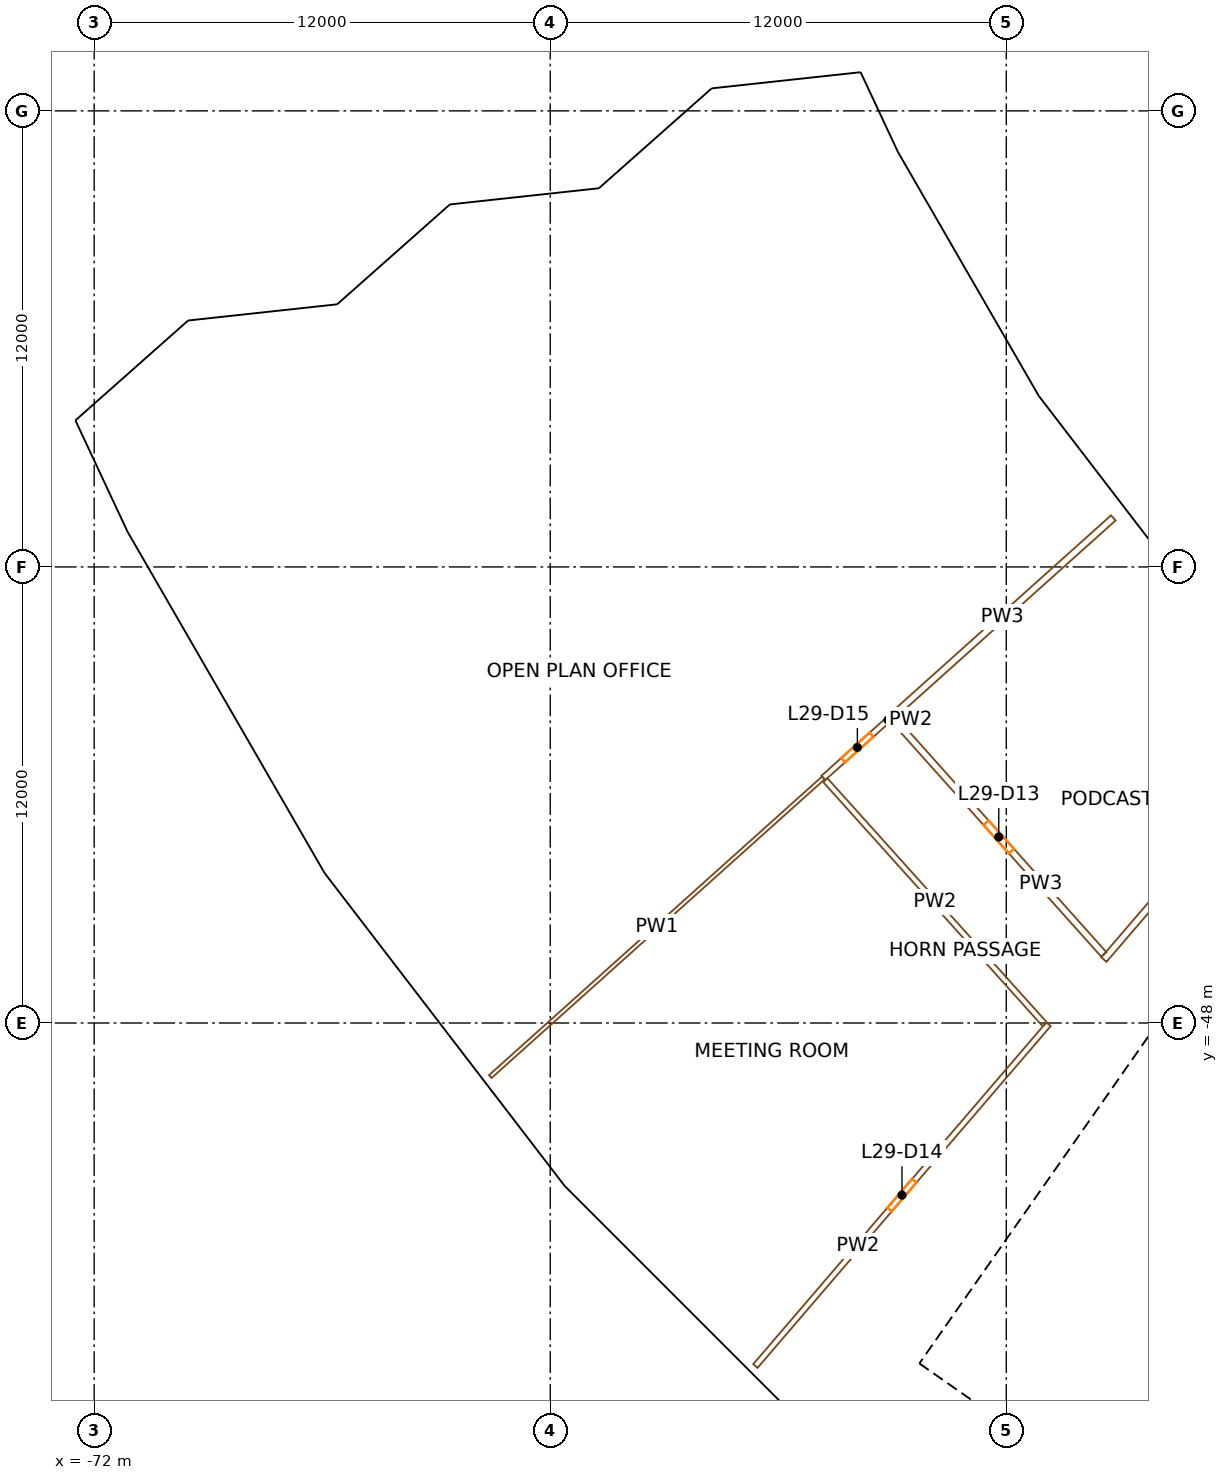
"""IFC4 building model, lengths in metres.
Left out: names, types, materials, properties, quantities, classifications, styles, units other than length and angle.
Written with IfcOpenShell. Run it as: python <this file> out.ifc"""

import sys

from ifc_helpers import new_model, si_unit, direction, frame, frame_2d, origin, origin_2d, place, context, subcontext, project, spatial, rectangle, extrude, element, fill, save


model = new_model("IFC4")
c1 = context("Model", 3, precision=1e-05, world=origin(), true_north=direction((0.0, 1.0)))
c2 = subcontext(c1, "Body", "Model", "MODEL_VIEW")
j1 = project(units=[si_unit("LENGTHUNIT", "METRE"), si_unit("PLANEANGLEUNIT", "RADIAN")], contexts=[c1])
p1 = place(None, origin())
s1 = spatial("IfcSite", under=j1, at=p1, CompositionType="ELEMENT")
p2 = place(p1, origin())
s2 = spatial("IfcBuilding", under=s1, at=p2, CompositionType="ELEMENT")
p3 = place(p2, frame((0.0, 0.0, 129.1)))
s3 = spatial("IfcBuildingStorey", under=s2, at=p3, CompositionType="ELEMENT", Elevation=129.1)
for number, where, z_axis, x_axis in (
    (1, (-52.243, -25.763, 0.0), (0.0, 0.0, 1.0), (0.442, -0.897, 0.0)),
    (2, (-69.732, -34.388, 0.0), (0.0, 0.0, 1.0), (0.442, -0.897, 0.0)),
    (3, (-48.433, -32.362, 0.0), (0.0, 0.0, 1.0), (0.556, -0.831, 0.0)),
    (4, (-64.647, -43.196, 0.0), (0.0, 0.0, 1.0), (0.556, -0.831, 0.0)),
    (5, (-43.795, -38.407, 0.0), (0.0, 0.0, 1.0), (0.659, -0.752, 0.0)),
    (6, (-58.456, -51.264, 0.0), (0.0, 0.0, 1.0), (0.659, -0.752, 0.0)),
    (7, (-51.264, -58.456, 0.0), (0.0, 0.0, 1.0), (0.752, -0.659, 0.0)),
):
    element("IfcColumn", number, at=place(p3, frame(where, z_axis=z_axis, x_axis=x_axis)), inside=s3, PredefinedType="COLUMN", context=c2, shape_type="SweptSolid", body=[
        extrude(rectangle(XDim=1.2, YDim=1.5, at=origin_2d()), origin(), (0.0, 0.0, 1.0), 3.8),
    ])
p4 = place(p3, frame((-49.779, -57.191, 0.0), z_axis=(0.0, 0.0, 1.0), x_axis=(0.573577477574, 0.819151315216, 0.0)))
e8 = element("IfcWall", 8, at=p4, inside=s3, PredefinedType="SHEAR", context=c2, shape_type="SweptSolid", body=[
    extrude(rectangle(XDim=14.8, YDim=0.9, at=frame_2d((7.4, 0.0))), origin(), (0.0, 0.0, 1.0), 3.5),
])
p5 = place(p4, frame((6.7, 0.0, 0.0)))
e9 = element("IfcOpeningElement", 9, at=p5, cuts=e8, PredefinedType="OPENING", context=c2, shape_type="SweptSolid", body=[
    extrude(rectangle(XDim=1.4, YDim=2.1, at=frame_2d((0.7, 1.05))), frame((0.0, 0.46, 0.0), z_axis=(0.0, -1.0, 0.0), x_axis=(1.0, 0.0, 0.0)), (0.0, 0.0, 1.0), 0.92),
])
p6 = place(p3, frame((-36.827, -65.71, 0.0), z_axis=(0.0, 0.0, 1.0), x_axis=(-0.819153391756, 0.573574511963, 0.0)))
e10 = element("IfcWall", 10, at=p6, inside=s3, PredefinedType="SHEAR", context=c2, shape_type="SweptSolid", body=[
    extrude(rectangle(XDim=15.045, YDim=0.9, at=frame_2d((7.523, 0.0))), origin(), (0.0, 0.0, 1.0), 3.5),
])
p7 = place(p6, frame((0.6, 0.0, 0.0)))
e11 = element("IfcOpeningElement", 11, at=p7, cuts=e10, PredefinedType="OPENING", context=c2, shape_type="SweptSolid", body=[
    extrude(rectangle(XDim=1.0, YDim=2.1, at=frame_2d((0.5, 1.05))), frame((0.0, 0.46, 0.0), z_axis=(0.0, -1.0, 0.0), x_axis=(1.0, 0.0, 0.0)), (0.0, 0.0, 1.0), 0.92),
])
p8 = place(p6, frame((3.275, 0.0, 0.0)))
e12 = element("IfcOpeningElement", 12, at=p8, cuts=e10, PredefinedType="OPENING", context=c2, shape_type="SweptSolid", body=[
    extrude(rectangle(XDim=1.0, YDim=2.1, at=frame_2d((0.5, 1.05))), frame((0.0, 0.46, 0.0), z_axis=(0.0, -1.0, 0.0), x_axis=(1.0, 0.0, 0.0)), (0.0, 0.0, 1.0), 0.92),
])
p9 = place(p6, frame((6.175, 0.0, 0.0)))
e13 = element("IfcOpeningElement", 13, at=p9, cuts=e10, PredefinedType="OPENING", context=c2, shape_type="SweptSolid", body=[
    extrude(rectangle(XDim=1.0, YDim=2.1, at=frame_2d((0.5, 1.05))), frame((0.0, 0.46, 0.0), z_axis=(0.0, -1.0, 0.0), x_axis=(1.0, 0.0, 0.0)), (0.0, 0.0, 1.0), 0.92),
])
p10 = place(p6, frame((13.495, 0.0, 0.0)))
e14 = element("IfcOpeningElement", 14, at=p10, cuts=e10, PredefinedType="OPENING", context=c2, shape_type="SweptSolid", body=[
    extrude(rectangle(XDim=1.1, YDim=2.1, at=frame_2d((0.55, 1.05))), frame((0.0, 0.46, 0.0), z_axis=(0.0, -1.0, 0.0), x_axis=(1.0, 0.0, 0.0)), (0.0, 0.0, 1.0), 0.92),
])
p11 = place(p3, frame((-41.262, -57.661, 0.0), z_axis=(0.0, 0.0, 1.0), x_axis=(-0.819164398642, 0.573558792102, 0.0)))
e15 = element("IfcWall", 15, at=p11, inside=s3, PredefinedType="SOLIDWALL", context=c2, shape_type="SweptSolid", body=[
    extrude(rectangle(XDim=6.795, YDim=0.3, at=frame_2d((3.397, 0.0))), origin(), (0.0, 0.0, 1.0), 3.5),
])
p12 = place(p11, frame((5.32, 0.0, 0.0)))
e16 = element("IfcOpeningElement", 16, at=p12, cuts=e15, PredefinedType="OPENING", context=c2, shape_type="SweptSolid", body=[
    extrude(rectangle(XDim=1.1, YDim=2.1, at=frame_2d((0.55, 1.05))), frame((0.0, 0.16, 0.0), z_axis=(0.0, -1.0, 0.0), x_axis=(1.0, 0.0, 0.0)), (0.0, 0.0, 1.0), 0.32),
])
p13 = place(p3, frame((-52.203, -23.224, 0.0), z_axis=(0.0, 0.0, 1.0), x_axis=(-0.99416672279, -0.107854194623, 0.0)))
e17 = element("IfcWall", 17, at=p13, inside=s3, PredefinedType="SOLIDWALL", context=c2, shape_type="SweptSolid", body=[
    extrude(rectangle(XDim=3.275, YDim=0.4, at=frame_2d((1.638, 0.0))), origin(), (0.0, 0.0, 1.0), 2.7),
])
p14 = place(p13, frame((0.638, 0.0, 0.9)))
e18 = element("IfcOpeningElement", 18, at=p14, cuts=e17, PredefinedType="OPENING", context=c2, shape_type="SweptSolid", body=[
    extrude(rectangle(XDim=2.0, YDim=1.425, at=frame_2d((1.0, 0.712))), frame((0.0, 0.21, 0.0), z_axis=(0.0, -1.0, 0.0), x_axis=(1.0, 0.0, 0.0)), (0.0, 0.0, 1.0), 0.42),
])
p15 = place(p3, frame((-55.581, -23.524, 0.0), z_axis=(0.0, 0.0, 1.0), x_axis=(-0.748618719126, -0.663000764233, 0.0)))
e19 = element("IfcWall", 19, at=p15, inside=s3, PredefinedType="SOLIDWALL", context=c2, shape_type="SweptSolid", body=[
    extrude(rectangle(XDim=4.195, YDim=0.4, at=frame_2d((2.097, 0.0))), origin(), (0.0, 0.0, 1.0), 2.7),
])
p16 = place(p15, frame((1.097, 0.0, 0.9)))
e20 = element("IfcOpeningElement", 20, at=p16, cuts=e19, PredefinedType="OPENING", context=c2, shape_type="SweptSolid", body=[
    extrude(rectangle(XDim=2.0, YDim=1.425, at=frame_2d((1.0, 0.712))), frame((0.0, 0.21, 0.0), z_axis=(0.0, -1.0, 0.0), x_axis=(1.0, 0.0, 0.0)), (0.0, 0.0, 1.0), 0.42),
])
p17 = place(p3, frame((-58.843, -26.251, 0.0), z_axis=(0.0, 0.0, 1.0), x_axis=(-0.99416014316, -0.107914826381, 0.0)))
e21 = element("IfcWall", 21, at=p17, inside=s3, PredefinedType="SOLIDWALL", context=c2, shape_type="SweptSolid", body=[
    extrude(rectangle(XDim=3.525, YDim=0.4, at=frame_2d((1.762, 0.0))), origin(), (0.0, 0.0, 1.0), 2.7),
])
p18 = place(p17, frame((0.762, 0.0, 0.9)))
e22 = element("IfcOpeningElement", 22, at=p18, cuts=e21, PredefinedType="OPENING", context=c2, shape_type="SweptSolid", body=[
    extrude(rectangle(XDim=2.0, YDim=1.425, at=frame_2d((1.0, 0.712))), frame((0.0, 0.21, 0.0), z_axis=(0.0, -1.0, 0.0), x_axis=(1.0, 0.0, 0.0)), (0.0, 0.0, 1.0), 0.42),
])
p19 = place(p3, frame((-62.469, -26.578, 0.0), z_axis=(0.0, 0.0, 1.0), x_axis=(-0.748522947977, -0.663108887252, 0.0)))
e23 = element("IfcWall", 23, at=p19, inside=s3, PredefinedType="SOLIDWALL", context=c2, shape_type="SweptSolid", body=[
    extrude(rectangle(XDim=4.193, YDim=0.4, at=frame_2d((2.097, 0.0))), origin(), (0.0, 0.0, 1.0), 2.7),
])
p20 = place(p19, frame((1.097, 0.0, 0.9)))
e24 = element("IfcOpeningElement", 24, at=p20, cuts=e23, PredefinedType="OPENING", context=c2, shape_type="SweptSolid", body=[
    extrude(rectangle(XDim=2.0, YDim=1.425, at=frame_2d((1.0, 0.712))), frame((0.0, 0.21, 0.0), z_axis=(0.0, -1.0, 0.0), x_axis=(1.0, 0.0, 0.0)), (0.0, 0.0, 1.0), 0.42),
])
p21 = place(p3, frame((-65.73, -29.304, 0.0), z_axis=(0.0, 0.0, 1.0), x_axis=(-0.994147697077, -0.108029423756, 0.0)))
e25 = element("IfcWall", 25, at=p21, inside=s3, PredefinedType="SOLIDWALL", context=c2, shape_type="SweptSolid", body=[
    extrude(rectangle(XDim=3.526, YDim=0.4, at=frame_2d((1.763, 0.0))), origin(), (0.0, 0.0, 1.0), 2.7),
])
p22 = place(p21, frame((0.763, 0.0, 0.9)))
e26 = element("IfcOpeningElement", 26, at=p22, cuts=e25, PredefinedType="OPENING", context=c2, shape_type="SweptSolid", body=[
    extrude(rectangle(XDim=2.0, YDim=1.425, at=frame_2d((1.0, 0.712))), frame((0.0, 0.21, 0.0), z_axis=(0.0, -1.0, 0.0), x_axis=(1.0, 0.0, 0.0)), (0.0, 0.0, 1.0), 0.42),
])
p23 = place(p3, frame((-69.357, -29.632, 0.0), z_axis=(0.0, 0.0, 1.0), x_axis=(-0.748462219631, -0.663177431601, 0.0)))
e27 = element("IfcWall", 27, at=p23, inside=s3, PredefinedType="SOLIDWALL", context=c2, shape_type="SweptSolid", body=[
    extrude(rectangle(XDim=4.013, YDim=0.4, at=frame_2d((2.007, 0.0))), origin(), (0.0, 0.0, 1.0), 2.7),
])
p24 = place(p23, frame((1.007, 0.0, 0.9)))
e28 = element("IfcOpeningElement", 28, at=p24, cuts=e27, PredefinedType="OPENING", context=c2, shape_type="SweptSolid", body=[
    extrude(rectangle(XDim=2.0, YDim=1.425, at=frame_2d((1.0, 0.712))), frame((0.0, 0.21, 0.0), z_axis=(0.0, -1.0, 0.0), x_axis=(1.0, 0.0, 0.0)), (0.0, 0.0, 1.0), 0.42),
])
p25 = place(p3, frame((-51.024, -25.184, 0.0), z_axis=(0.0, 0.0, 1.0), x_axis=(-0.42383284824, 0.905740424599, 0.0)))
e29 = element("IfcWall", 29, at=p25, inside=s3, PredefinedType="SOLIDWALL", context=c2, shape_type="SweptSolid", body=[
    extrude(rectangle(XDim=2.384, YDim=0.4, at=frame_2d((1.192, 0.0))), origin(), (0.0, 0.0, 1.0), 2.7),
])
p26 = place(p3, frame((-47.336, -31.568, 0.0), z_axis=(0.0, 0.0, 1.0), x_axis=(-0.499980071345, 0.866036909293, 0.0)))
e30 = element("IfcWall", 30, at=p26, inside=s3, PredefinedType="SOLIDWALL", context=c2, shape_type="SweptSolid", body=[
    extrude(rectangle(XDim=7.356, YDim=0.4, at=frame_2d((3.678, 0.0))), origin(), (0.0, 0.0, 1.0), 2.7),
])
p27 = place(p26, frame((4.225, 0.0, 0.9)))
e31 = element("IfcOpeningElement", 31, at=p27, cuts=e30, PredefinedType="OPENING", context=c2, shape_type="SweptSolid", body=[
    extrude(rectangle(XDim=2.6, YDim=1.65, at=frame_2d((1.3, 0.825))), frame((0.0, 0.21, 0.0), z_axis=(0.0, -1.0, 0.0), x_axis=(1.0, 0.0, 0.0)), (0.0, 0.0, 1.0), 0.42),
])
p28 = place(p26, frame((0.517, 0.0, 0.9)))
e32 = element("IfcOpeningElement", 32, at=p28, cuts=e30, PredefinedType="OPENING", context=c2, shape_type="SweptSolid", body=[
    extrude(rectangle(XDim=2.6, YDim=1.65, at=frame_2d((1.3, 0.825))), frame((0.0, 0.21, 0.0), z_axis=(0.0, -1.0, 0.0), x_axis=(1.0, 0.0, 0.0)), (0.0, 0.0, 1.0), 0.42),
])
p29 = place(p3, frame((-42.765, -37.537, 0.0), z_axis=(0.0, 0.0, 1.0), x_axis=(-0.608748204711, 0.793363487476, 0.0)))
e33 = element("IfcWall", 33, at=p29, inside=s3, PredefinedType="SOLIDWALL", context=c2, shape_type="SweptSolid", body=[
    extrude(rectangle(XDim=7.493, YDim=0.4, at=frame_2d((3.747, 0.0))), origin(), (0.0, 0.0, 1.0), 2.7),
])
p30 = place(p29, frame((4.301, 0.0, 0.9)))
e34 = element("IfcOpeningElement", 34, at=p30, cuts=e33, PredefinedType="OPENING", context=c2, shape_type="SweptSolid", body=[
    extrude(rectangle(XDim=2.6, YDim=1.65, at=frame_2d((1.3, 0.825))), frame((0.0, 0.21, 0.0), z_axis=(0.0, -1.0, 0.0), x_axis=(1.0, 0.0, 0.0)), (0.0, 0.0, 1.0), 0.42),
])
p31 = place(p29, frame((0.592, 0.0, 0.9)))
e35 = element("IfcOpeningElement", 35, at=p31, cuts=e33, PredefinedType="OPENING", context=c2, shape_type="SweptSolid", body=[
    extrude(rectangle(XDim=2.6, YDim=1.65, at=frame_2d((1.3, 0.825))), frame((0.0, 0.21, 0.0), z_axis=(0.0, -1.0, 0.0), x_axis=(1.0, 0.0, 0.0)), (0.0, 0.0, 1.0), 0.42),
])
p32 = place(p3, frame((-61.577, -49.409, 0.0), z_axis=(0.0, 0.0, 1.0), x_axis=(0.744506868351, 0.667614801347, 0.0)))
e36 = element("IfcWall", 36, at=p32, inside=s3, PredefinedType="PARTITIONING", context=c2, shape_type="SweptSolid", body=[
    extrude(rectangle(XDim=11.77, YDim=0.1, at=frame_2d((5.885, 0.0))), origin(), (0.0, 0.0, 1.0), 2.4),
])
p33 = place(p3, frame((-52.814, -41.552, 0.0), z_axis=(0.0, 0.0, 1.0), x_axis=(0.744484183784, 0.667640097729, 0.0)))
e37 = element("IfcWall", 37, at=p33, inside=s3, PredefinedType="PARTITIONING", context=c2, shape_type="SweptSolid", body=[
    extrude(rectangle(XDim=2.405, YDim=0.15, at=frame_2d((1.203, 0.0))), origin(), (0.0, 0.0, 1.0), 2.4),
])
p34 = place(p33, frame((0.703, 0.0, 0.0)))
e38 = element("IfcOpeningElement", 38, at=p34, cuts=e37, PredefinedType="OPENING", context=c2, shape_type="SweptSolid", body=[
    extrude(rectangle(XDim=1.0, YDim=2.1, at=frame_2d((0.5, 1.05))), frame((0.0, 0.085, 0.0), z_axis=(0.0, -1.0, 0.0), x_axis=(1.0, 0.0, 0.0)), (0.0, 0.0, 1.0), 0.17),
])
p35 = place(p3, frame((-51.023, -39.946, 0.0), z_axis=(0.0, 0.0, 1.0), x_axis=(0.744506479511, 0.667615234972, 0.0)))
e39 = element("IfcWall", 39, at=p35, inside=s3, PredefinedType="PARTITIONING", context=c2, shape_type="SweptSolid", body=[
    extrude(rectangle(XDim=7.843, YDim=0.18, at=frame_2d((3.921, 0.0))), origin(), (0.0, 0.0, 1.0), 2.4),
])
p36 = place(p3, frame((-54.601, -57.024, 0.0), z_axis=(0.0, 0.0, 1.0), x_axis=(0.650984855328, 0.759090717986, 0.0)))
e40 = element("IfcWall", 40, at=p36, inside=s3, PredefinedType="PARTITIONING", context=c2, shape_type="SweptSolid", body=[
    extrude(rectangle(XDim=11.845, YDim=0.15, at=frame_2d((5.922, 0.0))), origin(), (0.0, 0.0, 1.0), 2.4),
])
p37 = place(p36, frame((5.423, 0.0, 0.0)))
e41 = element("IfcOpeningElement", 41, at=p37, cuts=e40, PredefinedType="OPENING", context=c2, shape_type="SweptSolid", body=[
    extrude(rectangle(XDim=1.0, YDim=2.1, at=frame_2d((0.5, 1.05))), frame((0.0, 0.085, 0.0), z_axis=(0.0, -1.0, 0.0), x_axis=(1.0, 0.0, 0.0)), (0.0, 0.0, 1.0), 0.17),
])
p38 = place(p3, frame((-46.989, -48.034, 0.0), z_axis=(0.0, 0.0, 1.0), x_axis=(-0.668407219478, 0.743795528993, 0.0)))
e42 = element("IfcWall", 42, at=p38, inside=s3, PredefinedType="PARTITIONING", context=c2, shape_type="SweptSolid", body=[
    extrude(rectangle(XDim=8.64, YDim=0.15, at=frame_2d((4.32, 0.0))), origin(), (0.0, 0.0, 1.0), 2.4),
])
p39 = place(p3, frame((-50.963, -40.013, 0.0), z_axis=(0.0, 0.0, 1.0), x_axis=(0.666620223153, -0.745397530237, 0.0)))
e43 = element("IfcWall", 43, at=p39, inside=s3, PredefinedType="PARTITIONING", context=c2, shape_type="SweptSolid", body=[
    extrude(rectangle(XDim=8.296, YDim=0.18, at=frame_2d((4.148, 0.0))), origin(), (0.0, 0.0, 1.0), 2.4),
])
p40 = place(p39, frame((3.648, 0.0, 0.0)))
e44 = element("IfcOpeningElement", 44, at=p40, cuts=e43, PredefinedType="OPENING", context=c2, shape_type="SweptSolid", body=[
    extrude(rectangle(XDim=1.0, YDim=2.1, at=frame_2d((0.5, 1.05))), frame((0.0, 0.1, 0.0), z_axis=(0.0, -1.0, 0.0), x_axis=(1.0, 0.0, 0.0)), (0.0, 0.0, 1.0), 0.2),
])
p41 = place(p3, frame((-40.268, -40.311, 0.0), z_axis=(0.0, 0.0, 1.0), x_axis=(-0.65097638164, -0.759097984813, 0.0)))
e45 = element("IfcWall", 45, at=p41, inside=s3, PredefinedType="PARTITIONING", context=c2, shape_type="SweptSolid", body=[
    extrude(rectangle(XDim=7.932, YDim=0.18, at=frame_2d((3.966, 0.0))), origin(), (0.0, 0.0, 1.0), 2.4),
])
p42 = place(p5, origin())
e46 = element("IfcDoor", 46, at=p42, inside=s3, OperationType="DOUBLE_DOOR_SINGLE_SWING", PredefinedType="DOOR", context=c2, shape_type="SweptSolid", body=[
    extrude(rectangle(XDim=1.4, YDim=2.1, at=frame_2d((0.7, 1.05))), frame((0.0, 0.025, 0.0), z_axis=(0.0, -1.0, 0.0), x_axis=(1.0, 0.0, 0.0)), (0.0, 0.0, 1.0), 0.05),
])
fill(e9, e46)
p43 = place(p10, origin())
e47 = element("IfcDoor", 47, at=p43, inside=s3, OperationType="SINGLE_SWING_LEFT", PredefinedType="DOOR", context=c2, shape_type="SweptSolid", body=[
    extrude(rectangle(XDim=1.1, YDim=2.1, at=frame_2d((0.55, 1.05))), frame((0.0, 0.025, 0.0), z_axis=(0.0, -1.0, 0.0), x_axis=(1.0, 0.0, 0.0)), (0.0, 0.0, 1.0), 0.05),
])
fill(e14, e47)
p44 = place(p12, origin())
e48 = element("IfcDoor", 48, at=p44, inside=s3, OperationType="SINGLE_SWING_LEFT", PredefinedType="DOOR", context=c2, shape_type="SweptSolid", body=[
    extrude(rectangle(XDim=1.1, YDim=2.1, at=frame_2d((0.55, 1.05))), frame((0.0, 0.025, 0.0), z_axis=(0.0, -1.0, 0.0), x_axis=(1.0, 0.0, 0.0)), (0.0, 0.0, 1.0), 0.05),
])
fill(e16, e48)
p45 = place(p27, origin())
e49 = element("IfcWindow", 49, at=p45, inside=s3, PartitioningType="SINGLE_PANEL", PredefinedType="WINDOW", context=c2, shape_type="SweptSolid", body=[
    extrude(rectangle(XDim=2.6, YDim=1.65, at=frame_2d((1.3, 0.825))), frame((0.0, 0.03, 0.0), z_axis=(0.0, -1.0, 0.0), x_axis=(1.0, 0.0, 0.0)), (0.0, 0.0, 1.0), 0.06),
])
fill(e31, e49)
p46 = place(p28, origin())
e50 = element("IfcWindow", 50, at=p46, inside=s3, PartitioningType="SINGLE_PANEL", PredefinedType="WINDOW", context=c2, shape_type="SweptSolid", body=[
    extrude(rectangle(XDim=2.6, YDim=1.65, at=frame_2d((1.3, 0.825))), frame((0.0, 0.03, 0.0), z_axis=(0.0, -1.0, 0.0), x_axis=(1.0, 0.0, 0.0)), (0.0, 0.0, 1.0), 0.06),
])
fill(e32, e50)
p47 = place(p30, origin())
e51 = element("IfcWindow", 51, at=p47, inside=s3, PartitioningType="SINGLE_PANEL", PredefinedType="WINDOW", context=c2, shape_type="SweptSolid", body=[
    extrude(rectangle(XDim=2.6, YDim=1.65, at=frame_2d((1.3, 0.825))), frame((0.0, 0.03, 0.0), z_axis=(0.0, -1.0, 0.0), x_axis=(1.0, 0.0, 0.0)), (0.0, 0.0, 1.0), 0.06),
])
fill(e34, e51)
p48 = place(p31, origin())
e52 = element("IfcWindow", 52, at=p48, inside=s3, PartitioningType="SINGLE_PANEL", PredefinedType="WINDOW", context=c2, shape_type="SweptSolid", body=[
    extrude(rectangle(XDim=2.6, YDim=1.65, at=frame_2d((1.3, 0.825))), frame((0.0, 0.03, 0.0), z_axis=(0.0, -1.0, 0.0), x_axis=(1.0, 0.0, 0.0)), (0.0, 0.0, 1.0), 0.06),
])
fill(e35, e52)
p49 = place(p14, origin())
e53 = element("IfcWindow", 53, at=p49, inside=s3, PartitioningType="SINGLE_PANEL", PredefinedType="WINDOW", context=c2, shape_type="SweptSolid", body=[
    extrude(rectangle(XDim=2.0, YDim=1.425, at=frame_2d((1.0, 0.712))), frame((0.0, 0.03, 0.0), z_axis=(0.0, -1.0, 0.0), x_axis=(1.0, 0.0, 0.0)), (0.0, 0.0, 1.0), 0.06),
])
fill(e18, e53)
p50 = place(p16, origin())
e54 = element("IfcWindow", 54, at=p50, inside=s3, PartitioningType="SINGLE_PANEL", PredefinedType="WINDOW", context=c2, shape_type="SweptSolid", body=[
    extrude(rectangle(XDim=2.0, YDim=1.425, at=frame_2d((1.0, 0.712))), frame((0.0, 0.03, 0.0), z_axis=(0.0, -1.0, 0.0), x_axis=(1.0, 0.0, 0.0)), (0.0, 0.0, 1.0), 0.06),
])
fill(e20, e54)
p51 = place(p18, origin())
e55 = element("IfcWindow", 55, at=p51, inside=s3, PartitioningType="SINGLE_PANEL", PredefinedType="WINDOW", context=c2, shape_type="SweptSolid", body=[
    extrude(rectangle(XDim=2.0, YDim=1.425, at=frame_2d((1.0, 0.712))), frame((0.0, 0.03, 0.0), z_axis=(0.0, -1.0, 0.0), x_axis=(1.0, 0.0, 0.0)), (0.0, 0.0, 1.0), 0.06),
])
fill(e22, e55)
p52 = place(p20, origin())
e56 = element("IfcWindow", 56, at=p52, inside=s3, PartitioningType="SINGLE_PANEL", PredefinedType="WINDOW", context=c2, shape_type="SweptSolid", body=[
    extrude(rectangle(XDim=2.0, YDim=1.425, at=frame_2d((1.0, 0.712))), frame((0.0, 0.03, 0.0), z_axis=(0.0, -1.0, 0.0), x_axis=(1.0, 0.0, 0.0)), (0.0, 0.0, 1.0), 0.06),
])
fill(e24, e56)
p53 = place(p22, origin())
e57 = element("IfcWindow", 57, at=p53, inside=s3, PartitioningType="SINGLE_PANEL", PredefinedType="WINDOW", context=c2, shape_type="SweptSolid", body=[
    extrude(rectangle(XDim=2.0, YDim=1.425, at=frame_2d((1.0, 0.712))), frame((0.0, 0.03, 0.0), z_axis=(0.0, -1.0, 0.0), x_axis=(1.0, 0.0, 0.0)), (0.0, 0.0, 1.0), 0.06),
])
fill(e26, e57)
p54 = place(p24, origin())
e58 = element("IfcWindow", 58, at=p54, inside=s3, PartitioningType="SINGLE_PANEL", PredefinedType="WINDOW", context=c2, shape_type="SweptSolid", body=[
    extrude(rectangle(XDim=2.0, YDim=1.425, at=frame_2d((1.0, 0.712))), frame((0.0, 0.03, 0.0), z_axis=(0.0, -1.0, 0.0), x_axis=(1.0, 0.0, 0.0)), (0.0, 0.0, 1.0), 0.06),
])
fill(e28, e58)
p55 = place(p40, origin())
e59 = element("IfcDoor", 59, at=p55, inside=s3, OperationType="SINGLE_SWING_RIGHT", PredefinedType="DOOR", context=c2, shape_type="SweptSolid", body=[
    extrude(rectangle(XDim=1.0, YDim=2.1, at=frame_2d((0.5, 1.05))), frame((0.0, 0.025, 0.0), z_axis=(0.0, -1.0, 0.0), x_axis=(1.0, 0.0, 0.0)), (0.0, 0.0, 1.0), 0.05),
])
fill(e44, e59)
p56 = place(p37, origin())
e60 = element("IfcDoor", 60, at=p56, inside=s3, OperationType="SINGLE_SWING_RIGHT", PredefinedType="DOOR", context=c2, shape_type="SweptSolid", body=[
    extrude(rectangle(XDim=1.0, YDim=2.1, at=frame_2d((0.5, 1.05))), frame((0.0, 0.025, 0.0), z_axis=(0.0, -1.0, 0.0), x_axis=(1.0, 0.0, 0.0)), (0.0, 0.0, 1.0), 0.05),
])
fill(e41, e60)
p57 = place(p34, origin())
e61 = element("IfcDoor", 61, at=p57, inside=s3, OperationType="SINGLE_SWING_RIGHT", PredefinedType="DOOR", context=c2, shape_type="SweptSolid", body=[
    extrude(rectangle(XDim=1.0, YDim=2.1, at=frame_2d((0.5, 1.05))), frame((0.0, 0.025, 0.0), z_axis=(0.0, -1.0, 0.0), x_axis=(1.0, 0.0, 0.0)), (0.0, 0.0, 1.0), 0.05),
])
fill(e38, e61)
save(model, sys.argv[1])
